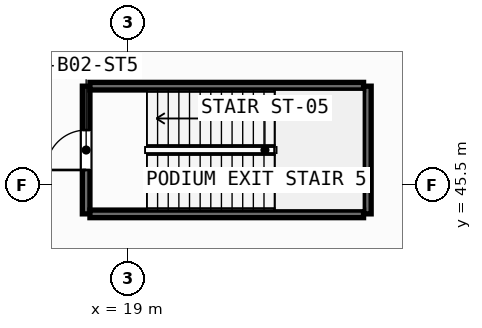
"""IFC4 building model, lengths in metres.
Left out: names, types, materials, properties, quantities, classifications, styles, units other than length and angle.
Written with IfcOpenShell. Run it as: python <this file> out.ifc"""

import sys

from ifc_helpers import new_model, si_unit, direction, frame, frame_2d, origin, place, context, subcontext, project, spatial, rectangle, extrude, source, transform, mapped, element, fill, save


model = new_model("IFC4")
c1 = context("Model", 3, precision=1e-05, world=origin(), true_north=direction((0.0, 1.0)))
c2 = subcontext(c1, "Body", "Model", "MODEL_VIEW")
j1 = project(units=[si_unit("LENGTHUNIT", "METRE"), si_unit("PLANEANGLEUNIT", "RADIAN")], contexts=[c1])
p1 = place(None, origin())
s1 = spatial("IfcSite", under=j1, at=p1, CompositionType="ELEMENT")
p2 = place(p1, origin())
s2 = spatial("IfcBuilding", under=s1, at=p2, CompositionType="ELEMENT")
p3 = place(p2, frame((0.0, 0.0, -9.0)))
s3 = spatial("IfcBuildingStorey", under=s2, at=p3, CompositionType="ELEMENT", Elevation=-9.0)
p4 = place(p3, frame((17.9, 44.74, 0.0), z_axis=(0.0, 0.0, 1.0), x_axis=(0.0, 1.0, 0.0)))
e1 = element("IfcWall", 1, at=p4, inside=s3, PredefinedType="SHEAR", context=c2, shape_type="SweptSolid", body=[
    extrude(rectangle(XDim=3.36, YDim=0.2, at=frame_2d((1.68, 0.0))), origin(), (0.0, 0.0, 1.0), 4.22),
])
p5 = place(p4, frame((1.155, 0.0, 0.0)))
e2 = element("IfcOpeningElement", 2, at=p5, cuts=e1, PredefinedType="OPENING", context=c2, shape_type="SweptSolid", body=[
    extrude(rectangle(XDim=1.05, YDim=2.15, at=frame_2d((0.525, 1.075))), frame((0.0, 0.11, 0.0), z_axis=(0.0, -1.0, 0.0), x_axis=(1.0, 0.0, 0.0)), (0.0, 0.0, 1.0), 0.22),
])
p6 = place(p3, frame((25.3, 48.1, 0.0), z_axis=(0.0, 0.0, 1.0), x_axis=(0.0, -1.0, 0.0)))
e3 = element("IfcWall", 3, at=p6, inside=s3, PredefinedType="SHEAR", context=c2, shape_type="SweptSolid", body=[
    extrude(rectangle(XDim=3.36, YDim=0.2, at=frame_2d((1.68, 0.0))), origin(), (0.0, 0.0, 1.0), 4.22),
])
for number, where, z_axis, x_axis in (
    (4, (25.2, 44.74, 0.0), (0.0, 0.0, 1.0), (-1.0, 0.0, 0.0)),
    (5, (18.0, 48.1, 0.0), (0.0, 0.0, 1.0), (1.0, 0.0, 0.0)),
):
    element("IfcWall", number, at=place(p3, frame(where, z_axis=z_axis, x_axis=x_axis)), inside=s3, PredefinedType="SHEAR", context=c2, shape_type="SweptSolid", body=[
        extrude(rectangle(XDim=7.2, YDim=0.2, at=frame_2d((3.6, 0.0))), origin(), (0.0, 0.0, 1.0), 4.22),
    ])
m1 = source(origin(), c2, "Body", "SweptSolid", [
    extrude(rectangle(XDim=1.05, YDim=2.15, at=frame_2d((0.525, 1.075))), frame((0.0, 0.025, 0.0), z_axis=(0.0, -1.0, 0.0), x_axis=(1.0, 0.0, 0.0)), (0.0, 0.0, 1.0), 0.05),
])
p7 = place(p5, origin())
e6 = element("IfcDoor", 6, at=p7, inside=s3, OperationType="SINGLE_SWING_LEFT", PredefinedType="DOOR", context=c2, shape_type="MappedRepresentation", body=[
    mapped(m1, transform((0.0, 0.0, 0.0), scale=1.0)),
])
fill(e2, e6)
save(model, sys.argv[1])
